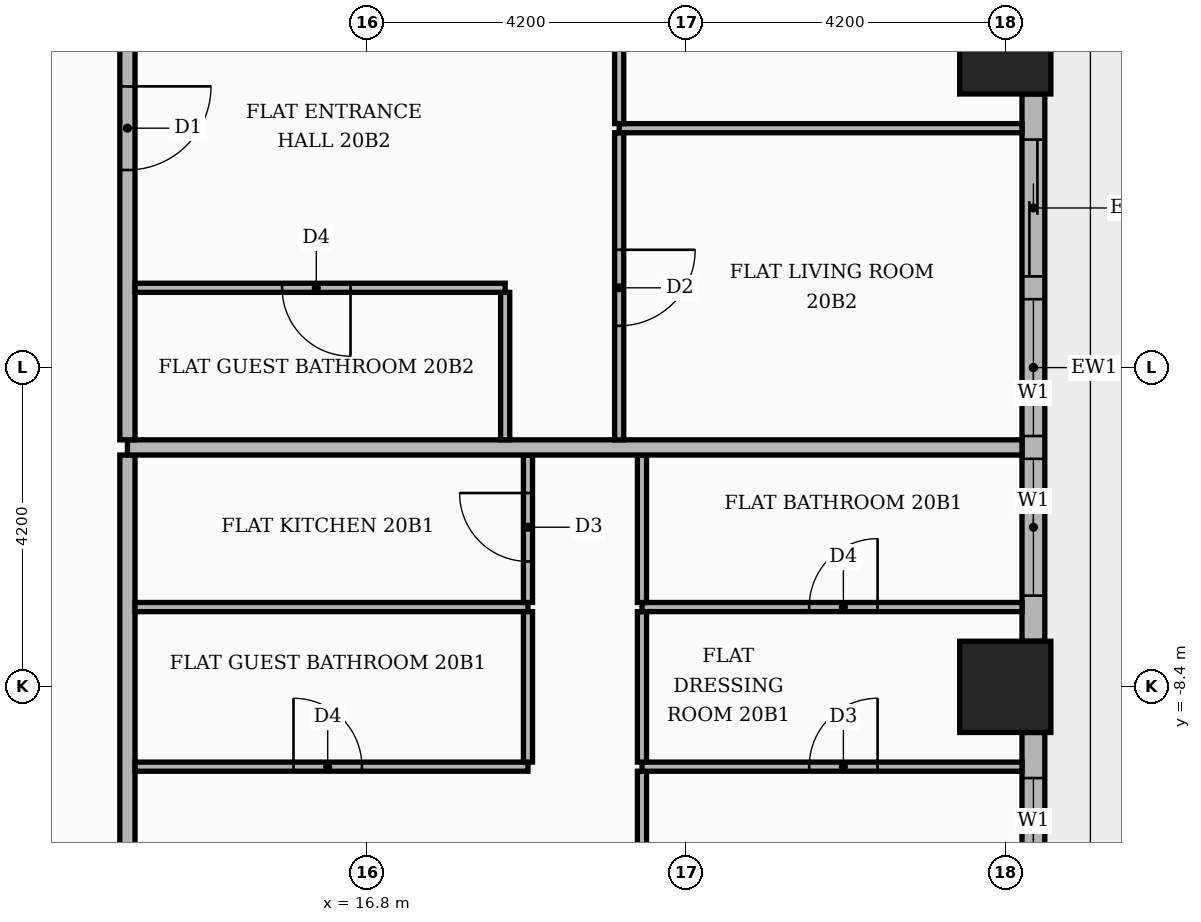
"""IFC4 building model, lengths in metres.
Left out: names, types, materials, properties, quantities, classifications, styles, units other than length and angle.
Written with IfcOpenShell. Run it as: python <this file> out.ifc"""

import sys

from ifc_helpers import new_model, si_unit, direction, frame, frame_2d, origin, origin_2d, place, context, subcontext, project, spatial, rectangle, extrude, element, fill, save


model = new_model("IFC4")
c1 = context("Model", 3, precision=1e-05, world=origin(), true_north=direction((0.0, 1.0)))
c2 = subcontext(c1, "Body", "Model", "MODEL_VIEW")
j1 = project(units=[si_unit("LENGTHUNIT", "METRE"), si_unit("PLANEANGLEUNIT", "RADIAN")], contexts=[c1])
p1 = place(None, origin())
s1 = spatial("IfcSite", under=j1, at=p1, CompositionType="ELEMENT")
p2 = place(p1, origin())
s2 = spatial("IfcBuilding", under=s1, at=p2, CompositionType="ELEMENT")
p3 = place(p2, frame((0.0, 0.0, 87.0)))
s3 = spatial("IfcBuildingStorey", under=s2, at=p3, CompositionType="ELEMENT", Elevation=87.0)
for number, where, z_axis, x_axis in (
    (1, (25.2, 0.0, 0.0), (0.0, 0.0, 1.0), (1.0, 0.0, 0.0)),
    (2, (25.2, -8.4, 0.0), (0.0, 0.0, 1.0), (1.0, 0.0, 0.0)),
):
    element("IfcColumn", number, at=place(p3, frame(where, z_axis=z_axis, x_axis=x_axis)), inside=s3, PredefinedType="COLUMN", context=c2, shape_type="SweptSolid", body=[
        extrude(rectangle(XDim=1.2, YDim=1.2, at=origin_2d()), origin(), (0.0, 0.0, 1.0), 3.9),
    ])
p4 = place(p3, frame((25.57, -16.2, 0.0), z_axis=(0.0, 0.0, 1.0), x_axis=(0.0, 1.0, 0.0)))
e3 = element("IfcWall", 3, at=p4, inside=s3, PredefinedType="STANDARD", context=c2, shape_type="SweptSolid", body=[
    extrude(rectangle(XDim=7.2, YDim=0.3, at=frame_2d((3.6, 0.0))), origin(), (0.0, 0.0, 1.0), 3.48),
])
p5 = place(p4, frame((0.6, 0.0, 0.0)))
e4 = element("IfcOpeningElement", 4, at=p5, cuts=e3, PredefinedType="OPENING", context=c2, shape_type="SweptSolid", body=[
    extrude(rectangle(XDim=1.8, YDim=2.4, at=frame_2d((0.9, 1.2))), frame((0.0, 0.16, 0.0), z_axis=(0.0, -1.0, 0.0), x_axis=(1.0, 0.0, 0.0)), (0.0, 0.0, 1.0), 0.32),
])
p6 = place(p4, frame((2.7, 0.0, 0.0)))
e5 = element("IfcOpeningElement", 5, at=p6, cuts=e3, PredefinedType="OPENING", context=c2, shape_type="SweptSolid", body=[
    extrude(rectangle(XDim=1.8, YDim=2.4, at=frame_2d((0.9, 1.2))), frame((0.0, 0.16, 0.0), z_axis=(0.0, -1.0, 0.0), x_axis=(1.0, 0.0, 0.0)), (0.0, 0.0, 1.0), 0.32),
])
p7 = place(p4, frame((4.8, 0.0, 0.9)))
e6 = element("IfcOpeningElement", 6, at=p7, cuts=e3, PredefinedType="OPENING", context=c2, shape_type="SweptSolid", body=[
    extrude(rectangle(XDim=1.8, YDim=2.1, at=frame_2d((0.9, 1.05))), frame((0.0, 0.16, 0.0), z_axis=(0.0, -1.0, 0.0), x_axis=(1.0, 0.0, 0.0)), (0.0, 0.0, 1.0), 0.32),
])
p8 = place(p3, frame((25.57, -7.8, 0.0), z_axis=(0.0, 0.0, 1.0), x_axis=(0.0, 1.0, 0.0)))
e7 = element("IfcWall", 7, at=p8, inside=s3, PredefinedType="STANDARD", context=c2, shape_type="SweptSolid", body=[
    extrude(rectangle(XDim=7.2, YDim=0.3, at=frame_2d((3.6, 0.0))), origin(), (0.0, 0.0, 1.0), 3.48),
])
p9 = place(p8, frame((0.6, 0.0, 0.9)))
e8 = element("IfcOpeningElement", 8, at=p9, cuts=e7, PredefinedType="OPENING", context=c2, shape_type="SweptSolid", body=[
    extrude(rectangle(XDim=1.8, YDim=2.1, at=frame_2d((0.9, 1.05))), frame((0.0, 0.16, 0.0), z_axis=(0.0, -1.0, 0.0), x_axis=(1.0, 0.0, 0.0)), (0.0, 0.0, 1.0), 0.32),
])
p10 = place(p8, frame((2.7, 0.0, 0.9)))
e9 = element("IfcOpeningElement", 9, at=p10, cuts=e7, PredefinedType="OPENING", context=c2, shape_type="SweptSolid", body=[
    extrude(rectangle(XDim=1.8, YDim=2.1, at=frame_2d((0.9, 1.05))), frame((0.0, 0.16, 0.0), z_axis=(0.0, -1.0, 0.0), x_axis=(1.0, 0.0, 0.0)), (0.0, 0.0, 1.0), 0.32),
])
p11 = place(p8, frame((4.8, 0.0, 0.0)))
e10 = element("IfcOpeningElement", 10, at=p11, cuts=e7, PredefinedType="OPENING", context=c2, shape_type="SweptSolid", body=[
    extrude(rectangle(XDim=1.8, YDim=2.4, at=frame_2d((0.9, 1.2))), frame((0.0, 0.16, 0.0), z_axis=(0.0, -1.0, 0.0), x_axis=(1.0, 0.0, 0.0)), (0.0, 0.0, 1.0), 0.32),
])
p12 = place(p3, frame((20.42, -13.59, 0.0), z_axis=(0.0, 0.0, 1.0), x_axis=(0.0, 1.0, 0.0)))
e11 = element("IfcWall", 11, at=p12, inside=s3, PredefinedType="PARTITIONING", context=c2, shape_type="SweptSolid", body=[
    extrude(rectangle(XDim=4.08, YDim=0.12, at=frame_2d((2.04, 0.0))), origin(), (0.0, 0.0, 1.0), 3.48),
])
p13 = place(p12, frame((1.59, 0.0, 0.0)))
e12 = element("IfcOpeningElement", 12, at=p13, cuts=e11, PredefinedType="OPENING", context=c2, shape_type="SweptSolid", body=[
    extrude(rectangle(XDim=0.9, YDim=2.1, at=frame_2d((0.45, 1.05))), frame((0.0, 0.07, 0.0), z_axis=(0.0, -1.0, 0.0), x_axis=(1.0, 0.0, 0.0)), (0.0, 0.0, 1.0), 0.14),
])
p14 = place(p3, frame((13.65, -13.55, 0.0), z_axis=(0.0, 0.0, 1.0), x_axis=(0.0, 1.0, 0.0)))
e13 = element("IfcWall", 13, at=p14, inside=s3, PredefinedType="PARTITIONING", context=c2, shape_type="SweptSolid", body=[
    extrude(rectangle(XDim=8.2, YDim=0.2, at=frame_2d((4.1, 0.0))), origin(), (0.0, 0.0, 1.0), 3.48),
])
p15 = place(p14, frame((1.45, 0.0, 0.0)))
e14 = element("IfcOpeningElement", 14, at=p15, cuts=e13, PredefinedType="OPENING", context=c2, shape_type="SweptSolid", body=[
    extrude(rectangle(XDim=1.1, YDim=2.4, at=frame_2d((0.55, 1.2))), frame((0.0, 0.11, 0.0), z_axis=(0.0, -1.0, 0.0), x_axis=(1.0, 0.0, 0.0)), (0.0, 0.0, 1.0), 0.22),
])
p16 = place(p3, frame((13.75, -9.45, 0.0), z_axis=(0.0, 0.0, 1.0), x_axis=(1.0, 0.0, 0.0)))
e15 = element("IfcWall", 15, at=p16, inside=s3, PredefinedType="PARTITIONING", context=c2, shape_type="SweptSolid", body=[
    extrude(rectangle(XDim=5.17, YDim=0.12, at=frame_2d((2.585, 0.0))), origin(), (0.0, 0.0, 1.0), 3.48),
])
p17 = place(p16, frame((2.085, 0.0, 0.0)))
e16 = element("IfcOpeningElement", 16, at=p17, cuts=e15, PredefinedType="OPENING", context=c2, shape_type="SweptSolid", body=[
    extrude(rectangle(XDim=0.9, YDim=2.1, at=frame_2d((0.45, 1.05))), frame((0.0, 0.07, 0.0), z_axis=(0.0, -1.0, 0.0), x_axis=(1.0, 0.0, 0.0)), (0.0, 0.0, 1.0), 0.14),
])
p18 = place(p3, frame((20.42, -9.45, 0.0), z_axis=(0.0, 0.0, 1.0), x_axis=(1.0, 0.0, 0.0)))
e17 = element("IfcWall", 17, at=p18, inside=s3, PredefinedType="PARTITIONING", context=c2, shape_type="SweptSolid", body=[
    extrude(rectangle(XDim=5.0, YDim=0.12, at=frame_2d((2.5, 0.0))), origin(), (0.0, 0.0, 1.0), 3.48),
])
p19 = place(p18, frame((2.2, 0.0, 0.0)))
e18 = element("IfcOpeningElement", 18, at=p19, cuts=e17, PredefinedType="OPENING", context=c2, shape_type="SweptSolid", body=[
    extrude(rectangle(XDim=0.9, YDim=2.1, at=frame_2d((0.45, 1.05))), frame((0.0, 0.07, 0.0), z_axis=(0.0, -1.0, 0.0), x_axis=(1.0, 0.0, 0.0)), (0.0, 0.0, 1.0), 0.14),
])
for number, where, z_axis, x_axis in (
    (19, (18.92, -9.39, 0.0), (0.0, 0.0, 1.0), (0.0, 1.0, 0.0)),
    (20, (20.42, -9.39, 0.0), (0.0, 0.0, 1.0), (0.0, 1.0, 0.0)),
):
    element("IfcWall", number, at=place(p3, frame(where, z_axis=z_axis, x_axis=x_axis)), inside=s3, PredefinedType="PARTITIONING", context=c2, shape_type="SweptSolid", body=[
        extrude(rectangle(XDim=1.98, YDim=0.12, at=frame_2d((0.99, 0.0))), origin(), (0.0, 0.0, 1.0), 3.48),
    ])
p20 = place(p3, frame((13.75, -7.35, 0.0), z_axis=(0.0, 0.0, 1.0), x_axis=(1.0, 0.0, 0.0)))
e21 = element("IfcWall", 21, at=p20, inside=s3, PredefinedType="PARTITIONING", context=c2, shape_type="SweptSolid", body=[
    extrude(rectangle(XDim=5.17, YDim=0.12, at=frame_2d((2.585, 0.0))), origin(), (0.0, 0.0, 1.0), 3.48),
])
p21 = place(p3, frame((20.42, -7.35, 0.0), z_axis=(0.0, 0.0, 1.0), x_axis=(1.0, 0.0, 0.0)))
e22 = element("IfcWall", 22, at=p21, inside=s3, PredefinedType="PARTITIONING", context=c2, shape_type="SweptSolid", body=[
    extrude(rectangle(XDim=5.0, YDim=0.12, at=frame_2d((2.5, 0.0))), origin(), (0.0, 0.0, 1.0), 3.48),
])
p22 = place(p21, frame((2.2, 0.0, 0.0)))
e23 = element("IfcOpeningElement", 23, at=p22, cuts=e22, PredefinedType="OPENING", context=c2, shape_type="SweptSolid", body=[
    extrude(rectangle(XDim=0.9, YDim=2.1, at=frame_2d((0.45, 1.05))), frame((0.0, 0.07, 0.0), z_axis=(0.0, -1.0, 0.0), x_axis=(1.0, 0.0, 0.0)), (0.0, 0.0, 1.0), 0.14),
])
p23 = place(p3, frame((18.92, -7.29, 0.0), z_axis=(0.0, 0.0, 1.0), x_axis=(0.0, 1.0, 0.0)))
e24 = element("IfcWall", 24, at=p23, inside=s3, PredefinedType="PARTITIONING", context=c2, shape_type="SweptSolid", body=[
    extrude(rectangle(XDim=1.94, YDim=0.12, at=frame_2d((0.97, 0.0))), origin(), (0.0, 0.0, 1.0), 3.48),
])
p24 = place(p23, frame((0.54, 0.0, 0.0)))
e25 = element("IfcOpeningElement", 25, at=p24, cuts=e24, PredefinedType="OPENING", context=c2, shape_type="SweptSolid", body=[
    extrude(rectangle(XDim=0.9, YDim=2.1, at=frame_2d((0.45, 1.05))), frame((0.0, 0.07, 0.0), z_axis=(0.0, -1.0, 0.0), x_axis=(1.0, 0.0, 0.0)), (0.0, 0.0, 1.0), 0.14),
])
p25 = place(p3, frame((20.42, -7.29, 0.0), z_axis=(0.0, 0.0, 1.0), x_axis=(0.0, 1.0, 0.0)))
e26 = element("IfcWall", 26, at=p25, inside=s3, PredefinedType="PARTITIONING", context=c2, shape_type="SweptSolid", body=[
    extrude(rectangle(XDim=1.94, YDim=0.12, at=frame_2d((0.97, 0.0))), origin(), (0.0, 0.0, 1.0), 3.48),
])
p26 = place(p3, frame((13.65, -5.25, 0.0), z_axis=(0.0, 0.0, 1.0), x_axis=(1.0, 0.0, 0.0)))
e27 = element("IfcWall", 27, at=p26, inside=s3, PredefinedType="PARTITIONING", context=c2, shape_type="SweptSolid", body=[
    extrude(rectangle(XDim=11.77, YDim=0.2, at=frame_2d((5.885, 0.0))), origin(), (0.0, 0.0, 1.0), 3.48),
])
p27 = place(p3, frame((13.65, -5.15, 0.0), z_axis=(0.0, 0.0, 1.0), x_axis=(0.0, 1.0, 0.0)))
e28 = element("IfcWall", 28, at=p27, inside=s3, PredefinedType="PARTITIONING", context=c2, shape_type="SweptSolid", body=[
    extrude(rectangle(XDim=18.7, YDim=0.2, at=frame_2d((9.35, 0.0))), origin(), (0.0, 0.0, 1.0), 3.48),
])
p28 = place(p27, frame((3.55, 0.0, 0.0)))
e29 = element("IfcOpeningElement", 29, at=p28, cuts=e28, PredefinedType="OPENING", context=c2, shape_type="SweptSolid", body=[
    extrude(rectangle(XDim=1.1, YDim=2.4, at=frame_2d((0.55, 1.2))), frame((0.0, 0.11, 0.0), z_axis=(0.0, -1.0, 0.0), x_axis=(1.0, 0.0, 0.0)), (0.0, 0.0, 1.0), 0.22),
])
p29 = place(p3, frame((18.62, -5.15, 0.0), z_axis=(0.0, 0.0, 1.0), x_axis=(0.0, 1.0, 0.0)))
e30 = element("IfcWall", 30, at=p29, inside=s3, PredefinedType="PARTITIONING", context=c2, shape_type="SweptSolid", body=[
    extrude(rectangle(XDim=1.94, YDim=0.12, at=frame_2d((0.97, 0.0))), origin(), (0.0, 0.0, 1.0), 3.48),
])
p30 = place(p3, frame((20.12, -5.15, 0.0), z_axis=(0.0, 0.0, 1.0), x_axis=(0.0, 1.0, 0.0)))
e31 = element("IfcWall", 31, at=p30, inside=s3, PredefinedType="PARTITIONING", context=c2, shape_type="SweptSolid", body=[
    extrude(rectangle(XDim=4.04, YDim=0.12, at=frame_2d((2.02, 0.0))), origin(), (0.0, 0.0, 1.0), 3.48),
])
p31 = place(p30, frame((1.5, 0.0, 0.0)))
e32 = element("IfcOpeningElement", 32, at=p31, cuts=e31, PredefinedType="OPENING", context=c2, shape_type="SweptSolid", body=[
    extrude(rectangle(XDim=1.0, YDim=2.1, at=frame_2d((0.5, 1.05))), frame((0.0, 0.07, 0.0), z_axis=(0.0, -1.0, 0.0), x_axis=(1.0, 0.0, 0.0)), (0.0, 0.0, 1.0), 0.14),
])
p32 = place(p3, frame((13.75, -3.15, 0.0), z_axis=(0.0, 0.0, 1.0), x_axis=(1.0, 0.0, 0.0)))
e33 = element("IfcWall", 33, at=p32, inside=s3, PredefinedType="PARTITIONING", context=c2, shape_type="SweptSolid", body=[
    extrude(rectangle(XDim=4.87, YDim=0.12, at=frame_2d((2.435, 0.0))), origin(), (0.0, 0.0, 1.0), 3.48),
])
p33 = place(p32, frame((1.935, 0.0, 0.0)))
e34 = element("IfcOpeningElement", 34, at=p33, cuts=e33, PredefinedType="OPENING", context=c2, shape_type="SweptSolid", body=[
    extrude(rectangle(XDim=0.9, YDim=2.1, at=frame_2d((0.45, 1.05))), frame((0.0, 0.07, 0.0), z_axis=(0.0, -1.0, 0.0), x_axis=(1.0, 0.0, 0.0)), (0.0, 0.0, 1.0), 0.14),
])
p34 = place(p3, frame((20.12, -1.05, 0.0), z_axis=(0.0, 0.0, 1.0), x_axis=(1.0, 0.0, 0.0)))
e35 = element("IfcWall", 35, at=p34, inside=s3, PredefinedType="PARTITIONING", context=c2, shape_type="SweptSolid", body=[
    extrude(rectangle(XDim=5.3, YDim=0.12, at=frame_2d((2.65, 0.0))), origin(), (0.0, 0.0, 1.0), 3.48),
])
p35 = place(p3, frame((20.12, -0.99, 0.0), z_axis=(0.0, 0.0, 1.0), x_axis=(0.0, 1.0, 0.0)))
e36 = element("IfcWall", 36, at=p35, inside=s3, PredefinedType="PARTITIONING", context=c2, shape_type="SweptSolid", body=[
    extrude(rectangle(XDim=4.08, YDim=0.12, at=frame_2d((2.04, 0.0))), origin(), (0.0, 0.0, 1.0), 3.48),
])
p36 = place(p35, frame((1.59, 0.0, 0.0)))
e37 = element("IfcOpeningElement", 37, at=p36, cuts=e36, PredefinedType="OPENING", context=c2, shape_type="SweptSolid", body=[
    extrude(rectangle(XDim=0.9, YDim=2.1, at=frame_2d((0.45, 1.05))), frame((0.0, 0.07, 0.0), z_axis=(0.0, -1.0, 0.0), x_axis=(1.0, 0.0, 0.0)), (0.0, 0.0, 1.0), 0.14),
])
p37 = place(p7, origin())
e38 = element("IfcWindow", 38, at=p37, inside=s3, PartitioningType="SINGLE_PANEL", PredefinedType="WINDOW", context=c2, shape_type="SweptSolid", body=[
    extrude(rectangle(XDim=1.8, YDim=2.1, at=frame_2d((0.9, 1.05))), frame((0.0, 0.03, 0.0), z_axis=(0.0, -1.0, 0.0), x_axis=(1.0, 0.0, 0.0)), (0.0, 0.0, 1.0), 0.06),
])
fill(e6, e38)
p38 = place(p9, origin())
e39 = element("IfcWindow", 39, at=p38, inside=s3, PartitioningType="SINGLE_PANEL", PredefinedType="WINDOW", context=c2, shape_type="SweptSolid", body=[
    extrude(rectangle(XDim=1.8, YDim=2.1, at=frame_2d((0.9, 1.05))), frame((0.0, 0.03, 0.0), z_axis=(0.0, -1.0, 0.0), x_axis=(1.0, 0.0, 0.0)), (0.0, 0.0, 1.0), 0.06),
])
fill(e8, e39)
p39 = place(p10, origin())
e40 = element("IfcWindow", 40, at=p39, inside=s3, PartitioningType="SINGLE_PANEL", PredefinedType="WINDOW", context=c2, shape_type="SweptSolid", body=[
    extrude(rectangle(XDim=1.8, YDim=2.1, at=frame_2d((0.9, 1.05))), frame((0.0, 0.03, 0.0), z_axis=(0.0, -1.0, 0.0), x_axis=(1.0, 0.0, 0.0)), (0.0, 0.0, 1.0), 0.06),
])
fill(e9, e40)
p40 = place(p11, origin())
e41 = element("IfcDoor", 41, at=p40, inside=s3, OperationType="SLIDING_TO_RIGHT", PredefinedType="DOOR", context=c2, shape_type="SweptSolid", body=[
    extrude(rectangle(XDim=1.8, YDim=2.4, at=frame_2d((0.9, 1.2))), frame((0.0, 0.025, 0.0), z_axis=(0.0, -1.0, 0.0), x_axis=(1.0, 0.0, 0.0)), (0.0, 0.0, 1.0), 0.05),
])
fill(e10, e41)
p41 = place(p17, origin())
e42 = element("IfcDoor", 42, at=p41, inside=s3, OperationType="SINGLE_SWING_LEFT", PredefinedType="DOOR", context=c2, shape_type="SweptSolid", body=[
    extrude(rectangle(XDim=0.9, YDim=2.1, at=frame_2d((0.45, 1.05))), frame((0.0, 0.025, 0.0), z_axis=(0.0, -1.0, 0.0), x_axis=(1.0, 0.0, 0.0)), (0.0, 0.0, 1.0), 0.05),
])
fill(e16, e42)
p42 = place(p24, origin())
e43 = element("IfcDoor", 43, at=p42, inside=s3, OperationType="SINGLE_SWING_RIGHT", PredefinedType="DOOR", context=c2, shape_type="SweptSolid", body=[
    extrude(rectangle(XDim=0.9, YDim=2.1, at=frame_2d((0.45, 1.05))), frame((0.0, 0.025, 0.0), z_axis=(0.0, -1.0, 0.0), x_axis=(1.0, 0.0, 0.0)), (0.0, 0.0, 1.0), 0.05),
])
fill(e25, e43)
p43 = place(p19, origin())
e44 = element("IfcDoor", 44, at=p43, inside=s3, OperationType="SINGLE_SWING_RIGHT", PredefinedType="DOOR", context=c2, shape_type="SweptSolid", body=[
    extrude(rectangle(XDim=0.9, YDim=2.1, at=frame_2d((0.45, 1.05))), frame((0.0, 0.025, 0.0), z_axis=(0.0, -1.0, 0.0), x_axis=(1.0, 0.0, 0.0)), (0.0, 0.0, 1.0), 0.05),
])
fill(e18, e44)
p44 = place(p22, origin())
e45 = element("IfcDoor", 45, at=p44, inside=s3, OperationType="SINGLE_SWING_RIGHT", PredefinedType="DOOR", context=c2, shape_type="SweptSolid", body=[
    extrude(rectangle(XDim=0.9, YDim=2.1, at=frame_2d((0.45, 1.05))), frame((0.0, 0.025, 0.0), z_axis=(0.0, -1.0, 0.0), x_axis=(1.0, 0.0, 0.0)), (0.0, 0.0, 1.0), 0.05),
])
fill(e23, e45)
p45 = place(p28, frame((1.1, 0.0, 0.0), z_axis=(0.0, 0.0, 1.0), x_axis=(-1.0, 0.0, 0.0)))
e46 = element("IfcDoor", 46, at=p45, inside=s3, OperationType="SINGLE_SWING_RIGHT", PredefinedType="DOOR", context=c2, shape_type="SweptSolid", body=[
    extrude(rectangle(XDim=1.1, YDim=2.4, at=frame_2d((0.55, 1.2))), frame((0.0, 0.025, 0.0), z_axis=(0.0, -1.0, 0.0), x_axis=(1.0, 0.0, 0.0)), (0.0, 0.0, 1.0), 0.05),
])
fill(e29, e46)
p46 = place(p33, frame((0.9, 0.0, 0.0), z_axis=(0.0, 0.0, 1.0), x_axis=(-1.0, 0.0, 0.0)))
e47 = element("IfcDoor", 47, at=p46, inside=s3, OperationType="SINGLE_SWING_RIGHT", PredefinedType="DOOR", context=c2, shape_type="SweptSolid", body=[
    extrude(rectangle(XDim=0.9, YDim=2.1, at=frame_2d((0.45, 1.05))), frame((0.0, 0.025, 0.0), z_axis=(0.0, -1.0, 0.0), x_axis=(1.0, 0.0, 0.0)), (0.0, 0.0, 1.0), 0.05),
])
fill(e34, e47)
p47 = place(p31, frame((1.0, 0.0, 0.0), z_axis=(0.0, 0.0, 1.0), x_axis=(-1.0, 0.0, 0.0)))
e48 = element("IfcDoor", 48, at=p47, inside=s3, OperationType="SINGLE_SWING_RIGHT", PredefinedType="DOOR", context=c2, shape_type="SweptSolid", body=[
    extrude(rectangle(XDim=1.0, YDim=2.1, at=frame_2d((0.5, 1.05))), frame((0.0, 0.025, 0.0), z_axis=(0.0, -1.0, 0.0), x_axis=(1.0, 0.0, 0.0)), (0.0, 0.0, 1.0), 0.05),
])
fill(e32, e48)
save(model, sys.argv[1])
